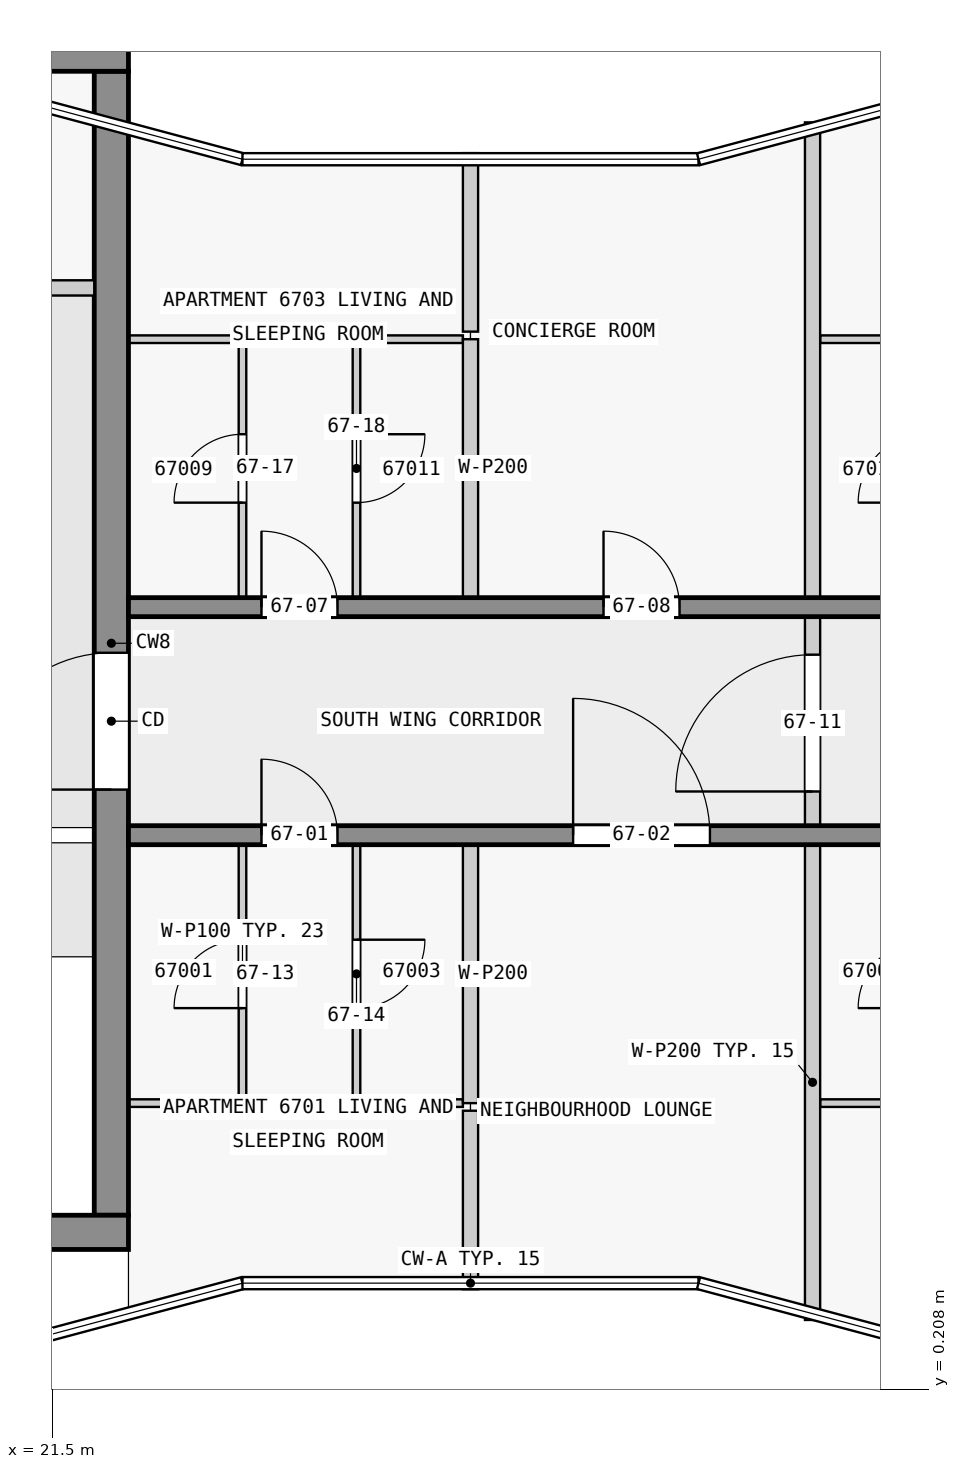
"""IFC4 building model, lengths in metres.
Left out: names, types, materials, properties, quantities, classifications, styles, units other than length and angle.
Written with IfcOpenShell. Run it as: python <this file> out.ifc"""

import sys

from ifc_helpers import new_model, si_unit, direction, frame, frame_2d, origin, place, context, subcontext, project, spatial, rectangle, extrude, element, fill, save


model = new_model("IFC4")
c1 = context("Model", 3, precision=1e-05, world=origin(), true_north=direction((0.0, 1.0)))
c2 = subcontext(c1, "Body", "Model", "MODEL_VIEW")
j1 = project(units=[si_unit("LENGTHUNIT", "METRE"), si_unit("PLANEANGLEUNIT", "RADIAN")], contexts=[c1])
p1 = place(None, origin())
s1 = spatial("IfcSite", under=j1, at=p1, CompositionType="ELEMENT")
p2 = place(p1, origin())
s2 = spatial("IfcBuilding", under=s1, at=p2, CompositionType="ELEMENT")
p3 = place(p2, frame((0.0, 0.0, 256.4)))
s3 = spatial("IfcBuildingStorey", under=s2, at=p3, CompositionType="ELEMENT", Elevation=256.4)
for number, where, z_axis, x_axis in (
    (1, (1.85, 2.275, 0.0), (0.0, 0.0, 1.0), (1.0, 0.0, 0.0)),
    (2, (1.85, 17.775, 0.0), (0.0, 0.0, 1.0), (1.0, 0.0, 0.0)),
):
    element("IfcWall", number, at=place(p3, frame(where, z_axis=z_axis, x_axis=x_axis)), inside=s3, PredefinedType="SHEAR", context=c2, shape_type="SweptSolid", body=[
        extrude(rectangle(XDim=20.65, YDim=0.45, at=frame_2d((10.325, 0.0))), origin(), (0.0, 0.0, 1.0), 3.25),
    ])
p4 = place(p3, frame((22.275, 2.5, 0.0), z_axis=(0.0, 0.0, 1.0), x_axis=(0.0, 1.0, 0.0)))
e3 = element("IfcWall", 3, at=p4, inside=s3, PredefinedType="SHEAR", context=c2, shape_type="SweptSolid", body=[
    extrude(rectangle(XDim=15.05, YDim=0.45, at=frame_2d((7.525, 0.0))), origin(), (0.0, 0.0, 1.0), 3.25),
])
p5 = place(p4, frame((5.6, 0.0, 0.0)))
e4 = element("IfcOpeningElement", 4, at=p5, cuts=e3, PredefinedType="OPENING", context=c2, shape_type="SweptSolid", body=[
    extrude(rectangle(XDim=1.8, YDim=2.1, at=frame_2d((0.9, 1.05))), frame((0.0, 0.235, 0.0), z_axis=(0.0, -1.0, 0.0), x_axis=(1.0, 0.0, 0.0)), (0.0, 0.0, 1.0), 0.47),
])
p6 = place(p3, frame((22.5, 7.5, 0.0), z_axis=(0.0, 0.0, 1.0), x_axis=(1.0, 0.0, 0.0)))
e5 = element("IfcWall", 5, at=p6, inside=s3, PredefinedType="SHEAR", context=c2, shape_type="SweptSolid", body=[
    extrude(rectangle(XDim=22.5, YDim=0.25, at=frame_2d((11.25, 0.0))), origin(), (0.0, 0.0, 1.0), 3.25),
])
p7 = place(p6, frame((1.75, 0.0, 0.0)))
e6 = element("IfcOpeningElement", 6, at=p7, cuts=e5, PredefinedType="OPENING", context=c2, shape_type="SweptSolid", body=[
    extrude(rectangle(XDim=1.0, YDim=2.1, at=frame_2d((0.5, 1.05))), frame((0.0, 0.135, 0.0), z_axis=(0.0, -1.0, 0.0), x_axis=(1.0, 0.0, 0.0)), (0.0, 0.0, 1.0), 0.27),
])
p8 = place(p6, frame((5.85, 0.0, 0.0)))
e7 = element("IfcOpeningElement", 7, at=p8, cuts=e5, PredefinedType="OPENING", context=c2, shape_type="SweptSolid", body=[
    extrude(rectangle(XDim=1.8, YDim=2.1, at=frame_2d((0.9, 1.05))), frame((0.0, 0.135, 0.0), z_axis=(0.0, -1.0, 0.0), x_axis=(1.0, 0.0, 0.0)), (0.0, 0.0, 1.0), 0.27),
])
p9 = place(p6, frame((10.75, 0.0, 0.0)))
e8 = element("IfcOpeningElement", 8, at=p9, cuts=e5, PredefinedType="OPENING", context=c2, shape_type="SweptSolid", body=[
    extrude(rectangle(XDim=1.0, YDim=2.1, at=frame_2d((0.5, 1.05))), frame((0.0, 0.135, 0.0), z_axis=(0.0, -1.0, 0.0), x_axis=(1.0, 0.0, 0.0)), (0.0, 0.0, 1.0), 0.27),
])
p10 = place(p6, frame((15.25, 0.0, 0.0)))
e9 = element("IfcOpeningElement", 9, at=p10, cuts=e5, PredefinedType="OPENING", context=c2, shape_type="SweptSolid", body=[
    extrude(rectangle(XDim=1.0, YDim=2.1, at=frame_2d((0.5, 1.05))), frame((0.0, 0.135, 0.0), z_axis=(0.0, -1.0, 0.0), x_axis=(1.0, 0.0, 0.0)), (0.0, 0.0, 1.0), 0.27),
])
p11 = place(p6, frame((18.75, 0.0, 0.0)))
e10 = element("IfcOpeningElement", 10, at=p11, cuts=e5, PredefinedType="OPENING", context=c2, shape_type="SweptSolid", body=[
    extrude(rectangle(XDim=0.9, YDim=2.1, at=frame_2d((0.45, 1.05))), frame((0.0, 0.135, 0.0), z_axis=(0.0, -1.0, 0.0), x_axis=(1.0, 0.0, 0.0)), (0.0, 0.0, 1.0), 0.27),
])
p12 = place(p6, frame((20.95, 0.0, 0.0)))
e11 = element("IfcOpeningElement", 11, at=p12, cuts=e5, PredefinedType="OPENING", context=c2, shape_type="SweptSolid", body=[
    extrude(rectangle(XDim=1.0, YDim=2.1, at=frame_2d((0.5, 1.05))), frame((0.0, 0.135, 0.0), z_axis=(0.0, -1.0, 0.0), x_axis=(1.0, 0.0, 0.0)), (0.0, 0.0, 1.0), 0.27),
])
p13 = place(p3, frame((22.5, 10.5, 0.0), z_axis=(0.0, 0.0, 1.0), x_axis=(1.0, 0.0, 0.0)))
e12 = element("IfcWall", 12, at=p13, inside=s3, PredefinedType="SHEAR", context=c2, shape_type="SweptSolid", body=[
    extrude(rectangle(XDim=22.5, YDim=0.25, at=frame_2d((11.25, 0.0))), origin(), (0.0, 0.0, 1.0), 3.25),
])
p14 = place(p13, frame((1.75, 0.0, 0.0)))
e13 = element("IfcOpeningElement", 13, at=p14, cuts=e12, PredefinedType="OPENING", context=c2, shape_type="SweptSolid", body=[
    extrude(rectangle(XDim=1.0, YDim=2.1, at=frame_2d((0.5, 1.05))), frame((0.0, 0.135, 0.0), z_axis=(0.0, -1.0, 0.0), x_axis=(1.0, 0.0, 0.0)), (0.0, 0.0, 1.0), 0.27),
])
p15 = place(p13, frame((6.25, 0.0, 0.0)))
e14 = element("IfcOpeningElement", 14, at=p15, cuts=e12, PredefinedType="OPENING", context=c2, shape_type="SweptSolid", body=[
    extrude(rectangle(XDim=1.0, YDim=2.1, at=frame_2d((0.5, 1.05))), frame((0.0, 0.135, 0.0), z_axis=(0.0, -1.0, 0.0), x_axis=(1.0, 0.0, 0.0)), (0.0, 0.0, 1.0), 0.27),
])
p16 = place(p13, frame((10.75, 0.0, 0.0)))
e15 = element("IfcOpeningElement", 15, at=p16, cuts=e12, PredefinedType="OPENING", context=c2, shape_type="SweptSolid", body=[
    extrude(rectangle(XDim=1.0, YDim=2.1, at=frame_2d((0.5, 1.05))), frame((0.0, 0.135, 0.0), z_axis=(0.0, -1.0, 0.0), x_axis=(1.0, 0.0, 0.0)), (0.0, 0.0, 1.0), 0.27),
])
p17 = place(p13, frame((16.85, 0.0, 0.0)))
e16 = element("IfcOpeningElement", 16, at=p17, cuts=e12, PredefinedType="OPENING", context=c2, shape_type="SweptSolid", body=[
    extrude(rectangle(XDim=1.0, YDim=2.1, at=frame_2d((0.5, 1.05))), frame((0.0, 0.135, 0.0), z_axis=(0.0, -1.0, 0.0), x_axis=(1.0, 0.0, 0.0)), (0.0, 0.0, 1.0), 0.27),
])
p18 = place(p3, frame((18.6, 14.7, 0.0), z_axis=(0.0, 0.0, 1.0), x_axis=(1.0, 0.0, 0.0)))
e17 = element("IfcWall", 17, at=p18, inside=s3, PredefinedType="PARTITIONING", context=c2, shape_type="SweptSolid", body=[
    extrude(rectangle(XDim=3.45, YDim=0.2, at=frame_2d((1.725, 0.0))), origin(), (0.0, 0.0, 1.0), 3.25),
])
p19 = place(p18, frame((0.15, 0.0, 0.0)))
e18 = element("IfcOpeningElement", 18, at=p19, cuts=e17, PredefinedType="OPENING", context=c2, shape_type="SweptSolid", body=[
    extrude(rectangle(XDim=0.9, YDim=2.1, at=frame_2d((0.45, 1.05))), frame((0.0, 0.11, 0.0), z_axis=(0.0, -1.0, 0.0), x_axis=(1.0, 0.0, 0.0)), (0.0, 0.0, 1.0), 0.22),
])
p20 = place(p18, frame((1.875, 0.0, 0.0)))
e19 = element("IfcOpeningElement", 19, at=p20, cuts=e17, PredefinedType="OPENING", context=c2, shape_type="SweptSolid", body=[
    extrude(rectangle(XDim=0.9, YDim=2.1, at=frame_2d((0.45, 1.05))), frame((0.0, 0.11, 0.0), z_axis=(0.0, -1.0, 0.0), x_axis=(1.0, 0.0, 0.0)), (0.0, 0.0, 1.0), 0.22),
])
p21 = place(p3, frame((22.5, 3.975, 0.0), z_axis=(0.0, 0.0, 1.0), x_axis=(1.0, 0.0, 0.0)))
e20 = element("IfcWall", 20, at=p21, inside=s3, PredefinedType="PARTITIONING", context=c2, shape_type="SweptSolid", body=[
    extrude(rectangle(XDim=1.45, YDim=0.1, at=frame_2d((0.725, 0.0))), origin(), (0.0, 0.0, 1.0), 3.25),
])
for number, where, z_axis, x_axis in (
    (21, (25.55, 3.975, 0.0), (0.0, 0.0, 1.0), (1.0, 0.0, 0.0)),
    (22, (31.6, 3.975, 0.0), (0.0, 0.0, 1.0), (1.0, 0.0, 0.0)),
):
    element("IfcWall", number, at=place(p3, frame(where, z_axis=z_axis, x_axis=x_axis)), inside=s3, PredefinedType="PARTITIONING", context=c2, shape_type="SweptSolid", body=[
        extrude(rectangle(XDim=1.35, YDim=0.1, at=frame_2d((0.675, 0.0))), origin(), (0.0, 0.0, 1.0), 3.25),
    ])
p22 = place(p3, frame((23.95, 14.025, 0.0), z_axis=(0.0, 0.0, 1.0), x_axis=(-1.0, 0.0, 0.0)))
e23 = element("IfcWall", 23, at=p22, inside=s3, PredefinedType="PARTITIONING", context=c2, shape_type="SweptSolid", body=[
    extrude(rectangle(XDim=1.45, YDim=0.1, at=frame_2d((0.725, 0.0))), origin(), (0.0, 0.0, 1.0), 3.25),
])
for number, where, z_axis, x_axis in (
    (24, (26.9, 14.025, 0.0), (0.0, 0.0, 1.0), (-1.0, 0.0, 0.0)),
    (25, (32.95, 14.025, 0.0), (0.0, 0.0, 1.0), (-1.0, 0.0, 0.0)),
):
    element("IfcWall", number, at=place(p3, frame(where, z_axis=z_axis, x_axis=x_axis)), inside=s3, PredefinedType="PARTITIONING", context=c2, shape_type="SweptSolid", body=[
        extrude(rectangle(XDim=1.35, YDim=0.1, at=frame_2d((0.675, 0.0))), origin(), (0.0, 0.0, 1.0), 3.25),
    ])
p23 = place(p3, frame((24.0, 3.975, 0.0), z_axis=(0.0, 0.0, 1.0), x_axis=(0.0, 1.0, 0.0)))
e26 = element("IfcWall", 26, at=p23, inside=s3, PredefinedType="PARTITIONING", context=c2, shape_type="SweptSolid", body=[
    extrude(rectangle(XDim=3.4, YDim=0.1, at=frame_2d((1.7, 0.0))), origin(), (0.0, 0.0, 1.0), 3.25),
])
p24 = place(p23, frame((1.25, 0.0, 0.0)))
e27 = element("IfcOpeningElement", 27, at=p24, cuts=e26, PredefinedType="OPENING", context=c2, shape_type="SweptSolid", body=[
    extrude(rectangle(XDim=0.9, YDim=2.1, at=frame_2d((0.45, 1.05))), frame((0.0, 0.06, 0.0), z_axis=(0.0, -1.0, 0.0), x_axis=(1.0, 0.0, 0.0)), (0.0, 0.0, 1.0), 0.12),
])
p25 = place(p3, frame((24.0, 10.625, 0.0), z_axis=(0.0, 0.0, 1.0), x_axis=(0.0, 1.0, 0.0)))
e28 = element("IfcWall", 28, at=p25, inside=s3, PredefinedType="PARTITIONING", context=c2, shape_type="SweptSolid", body=[
    extrude(rectangle(XDim=3.4, YDim=0.1, at=frame_2d((1.7, 0.0))), origin(), (0.0, 0.0, 1.0), 3.25),
])
p26 = place(p25, frame((1.25, 0.0, 0.0)))
e29 = element("IfcOpeningElement", 29, at=p26, cuts=e28, PredefinedType="OPENING", context=c2, shape_type="SweptSolid", body=[
    extrude(rectangle(XDim=0.9, YDim=2.1, at=frame_2d((0.45, 1.05))), frame((0.0, 0.06, 0.0), z_axis=(0.0, -1.0, 0.0), x_axis=(1.0, 0.0, 0.0)), (0.0, 0.0, 1.0), 0.12),
])
p27 = place(p3, frame((25.5, 7.375, 0.0), z_axis=(0.0, 0.0, 1.0), x_axis=(0.0, -1.0, 0.0)))
e30 = element("IfcWall", 30, at=p27, inside=s3, PredefinedType="PARTITIONING", context=c2, shape_type="SweptSolid", body=[
    extrude(rectangle(XDim=3.4, YDim=0.1, at=frame_2d((1.7, 0.0))), origin(), (0.0, 0.0, 1.0), 3.25),
])
p28 = place(p27, frame((1.25, 0.0, 0.0)))
e31 = element("IfcOpeningElement", 31, at=p28, cuts=e30, PredefinedType="OPENING", context=c2, shape_type="SweptSolid", body=[
    extrude(rectangle(XDim=0.9, YDim=2.1, at=frame_2d((0.45, 1.05))), frame((0.0, 0.06, 0.0), z_axis=(0.0, -1.0, 0.0), x_axis=(1.0, 0.0, 0.0)), (0.0, 0.0, 1.0), 0.12),
])
p29 = place(p3, frame((25.5, 14.025, 0.0), z_axis=(0.0, 0.0, 1.0), x_axis=(0.0, -1.0, 0.0)))
e32 = element("IfcWall", 32, at=p29, inside=s3, PredefinedType="PARTITIONING", context=c2, shape_type="SweptSolid", body=[
    extrude(rectangle(XDim=3.4, YDim=0.1, at=frame_2d((1.7, 0.0))), origin(), (0.0, 0.0, 1.0), 3.25),
])
p30 = place(p29, frame((1.25, 0.0, 0.0)))
e33 = element("IfcOpeningElement", 33, at=p30, cuts=e32, PredefinedType="OPENING", context=c2, shape_type="SweptSolid", body=[
    extrude(rectangle(XDim=0.9, YDim=2.1, at=frame_2d((0.45, 1.05))), frame((0.0, 0.06, 0.0), z_axis=(0.0, -1.0, 0.0), x_axis=(1.0, 0.0, 0.0)), (0.0, 0.0, 1.0), 0.12),
])
for number, where, z_axis, x_axis in (
    (34, (27.0, 3.875, 0.0), (0.0, 0.0, 1.0), (0.0, -1.0, 0.0)),
    (35, (27.0, 16.473, 0.0), (0.0, 0.0, 1.0), (0.0, -1.0, 0.0)),
):
    element("IfcWall", number, at=place(p3, frame(where, z_axis=z_axis, x_axis=x_axis)), inside=s3, PredefinedType="PARTITIONING", context=c2, shape_type="SweptSolid", body=[
        extrude(rectangle(XDim=2.348, YDim=0.2, at=frame_2d((1.174, 0.0))), origin(), (0.0, 0.0, 1.0), 3.25),
    ])
for number, where, z_axis, x_axis in (
    (36, (27.0, 3.975, 0.0), (0.0, 0.0, 1.0), (0.0, 1.0, 0.0)),
    (37, (27.0, 10.625, 0.0), (0.0, 0.0, 1.0), (0.0, 1.0, 0.0)),
):
    element("IfcWall", number, at=place(p3, frame(where, z_axis=z_axis, x_axis=x_axis)), inside=s3, PredefinedType="PARTITIONING", context=c2, shape_type="SweptSolid", body=[
        extrude(rectangle(XDim=3.4, YDim=0.2, at=frame_2d((1.7, 0.0))), origin(), (0.0, 0.0, 1.0), 3.25),
    ])
for number, where, z_axis, x_axis in (
    (38, (31.5, 1.122, 0.0), (0.0, 0.0, 1.0), (0.0, 1.0, 0.0)),
    (39, (31.5, 10.625, 0.0), (0.0, 0.0, 1.0), (0.0, 1.0, 0.0)),
):
    element("IfcWall", number, at=place(p3, frame(where, z_axis=z_axis, x_axis=x_axis)), inside=s3, PredefinedType="PARTITIONING", context=c2, shape_type="SweptSolid", body=[
        extrude(rectangle(XDim=6.253, YDim=0.2, at=frame_2d((3.126, 0.0))), origin(), (0.0, 0.0, 1.0), 3.25),
    ])
p31 = place(p3, frame((31.5, 7.475, 0.0), z_axis=(0.0, 0.0, 1.0), x_axis=(0.0, 1.0, 0.0)))
e40 = element("IfcWall", 40, at=p31, inside=s3, PredefinedType="PARTITIONING", context=c2, shape_type="SweptSolid", body=[
    extrude(rectangle(XDim=3.05, YDim=0.2, at=frame_2d((1.525, 0.0))), origin(), (0.0, 0.0, 1.0), 3.25),
])
p32 = place(p31, frame((0.6, 0.0, 0.0)))
e41 = element("IfcOpeningElement", 41, at=p32, cuts=e40, PredefinedType="OPENING", context=c2, shape_type="SweptSolid", body=[
    extrude(rectangle(XDim=1.8, YDim=2.1, at=frame_2d((0.9, 1.05))), frame((0.0, 0.11, 0.0), z_axis=(0.0, -1.0, 0.0), x_axis=(1.0, 0.0, 0.0)), (0.0, 0.0, 1.0), 0.22),
])
p33 = place(p5, origin())
e42 = element("IfcDoor", 42, at=p33, inside=s3, OperationType="DOUBLE_DOOR_SINGLE_SWING", PredefinedType="DOOR", context=c2, shape_type="SweptSolid", body=[
    extrude(rectangle(XDim=1.8, YDim=2.1, at=frame_2d((0.9, 1.05))), frame((0.0, 0.025, 0.0), z_axis=(0.0, -1.0, 0.0), x_axis=(1.0, 0.0, 0.0)), (0.0, 0.0, 1.0), 0.05),
])
fill(e4, e42)
p34 = place(p7, origin())
e43 = element("IfcDoor", 43, at=p34, inside=s3, OperationType="SINGLE_SWING_LEFT", PredefinedType="DOOR", context=c2, shape_type="SweptSolid", body=[
    extrude(rectangle(XDim=1.0, YDim=2.1, at=frame_2d((0.5, 1.05))), frame((0.0, 0.025, 0.0), z_axis=(0.0, -1.0, 0.0), x_axis=(1.0, 0.0, 0.0)), (0.0, 0.0, 1.0), 0.05),
])
fill(e6, e43)
p35 = place(p8, origin())
e44 = element("IfcDoor", 44, at=p35, inside=s3, OperationType="SINGLE_SWING_LEFT", PredefinedType="DOOR", context=c2, shape_type="SweptSolid", body=[
    extrude(rectangle(XDim=1.8, YDim=2.1, at=frame_2d((0.9, 1.05))), frame((0.0, 0.025, 0.0), z_axis=(0.0, -1.0, 0.0), x_axis=(1.0, 0.0, 0.0)), (0.0, 0.0, 1.0), 0.05),
])
fill(e7, e44)
p36 = place(p14, origin())
e45 = element("IfcDoor", 45, at=p36, inside=s3, OperationType="SINGLE_SWING_LEFT", PredefinedType="DOOR", context=c2, shape_type="SweptSolid", body=[
    extrude(rectangle(XDim=1.0, YDim=2.1, at=frame_2d((0.5, 1.05))), frame((0.0, 0.025, 0.0), z_axis=(0.0, -1.0, 0.0), x_axis=(1.0, 0.0, 0.0)), (0.0, 0.0, 1.0), 0.05),
])
fill(e13, e45)
p37 = place(p15, origin())
e46 = element("IfcDoor", 46, at=p37, inside=s3, OperationType="SINGLE_SWING_LEFT", PredefinedType="DOOR", context=c2, shape_type="SweptSolid", body=[
    extrude(rectangle(XDim=1.0, YDim=2.1, at=frame_2d((0.5, 1.05))), frame((0.0, 0.025, 0.0), z_axis=(0.0, -1.0, 0.0), x_axis=(1.0, 0.0, 0.0)), (0.0, 0.0, 1.0), 0.05),
])
fill(e14, e46)
p38 = place(p32, origin())
e47 = element("IfcDoor", 47, at=p38, inside=s3, OperationType="SINGLE_SWING_LEFT", PredefinedType="DOOR", context=c2, shape_type="SweptSolid", body=[
    extrude(rectangle(XDim=1.8, YDim=2.1, at=frame_2d((0.9, 1.05))), frame((0.0, 0.025, 0.0), z_axis=(0.0, -1.0, 0.0), x_axis=(1.0, 0.0, 0.0)), (0.0, 0.0, 1.0), 0.05),
])
fill(e41, e47)
p39 = place(p24, origin())
e48 = element("IfcDoor", 48, at=p39, inside=s3, OperationType="SINGLE_SWING_LEFT", PredefinedType="DOOR", context=c2, shape_type="SweptSolid", body=[
    extrude(rectangle(XDim=0.9, YDim=2.1, at=frame_2d((0.45, 1.05))), frame((0.0, 0.025, 0.0), z_axis=(0.0, -1.0, 0.0), x_axis=(1.0, 0.0, 0.0)), (0.0, 0.0, 1.0), 0.05),
])
fill(e27, e48)
p40 = place(p28, origin())
e49 = element("IfcDoor", 49, at=p40, inside=s3, OperationType="SINGLE_SWING_LEFT", PredefinedType="DOOR", context=c2, shape_type="SweptSolid", body=[
    extrude(rectangle(XDim=0.9, YDim=2.1, at=frame_2d((0.45, 1.05))), frame((0.0, 0.025, 0.0), z_axis=(0.0, -1.0, 0.0), x_axis=(1.0, 0.0, 0.0)), (0.0, 0.0, 1.0), 0.05),
])
fill(e31, e49)
p41 = place(p26, origin())
e50 = element("IfcDoor", 50, at=p41, inside=s3, OperationType="SINGLE_SWING_LEFT", PredefinedType="DOOR", context=c2, shape_type="SweptSolid", body=[
    extrude(rectangle(XDim=0.9, YDim=2.1, at=frame_2d((0.45, 1.05))), frame((0.0, 0.025, 0.0), z_axis=(0.0, -1.0, 0.0), x_axis=(1.0, 0.0, 0.0)), (0.0, 0.0, 1.0), 0.05),
])
fill(e29, e50)
p42 = place(p30, origin())
e51 = element("IfcDoor", 51, at=p42, inside=s3, OperationType="SINGLE_SWING_LEFT", PredefinedType="DOOR", context=c2, shape_type="SweptSolid", body=[
    extrude(rectangle(XDim=0.9, YDim=2.1, at=frame_2d((0.45, 1.05))), frame((0.0, 0.025, 0.0), z_axis=(0.0, -1.0, 0.0), x_axis=(1.0, 0.0, 0.0)), (0.0, 0.0, 1.0), 0.05),
])
fill(e33, e51)
save(model, sys.argv[1])
